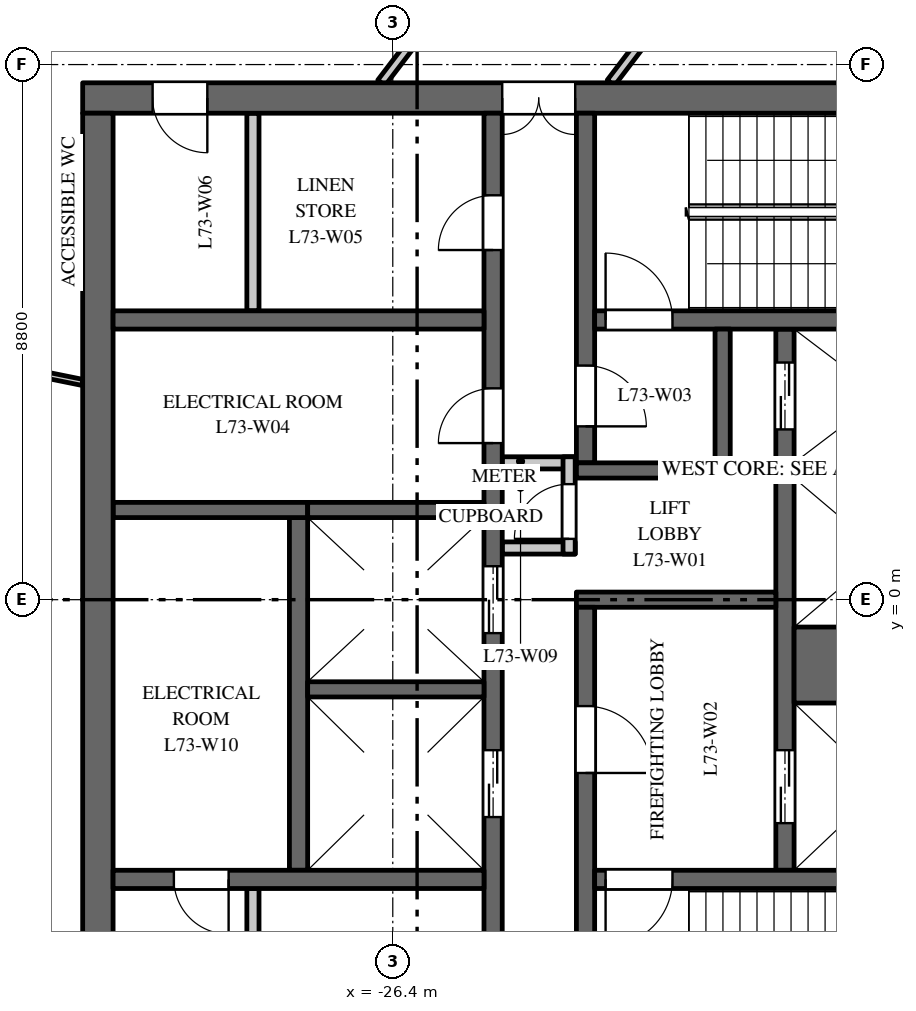
"""IFC4 building model, lengths in metres.
Left out: names, types, materials, properties, quantities, classifications, styles, units other than length and angle.
Written with IfcOpenShell. Run it as: python <this file> out.ifc"""

import sys

from ifc_helpers import new_model, si_unit, direction, frame, frame_2d, origin, origin_2d, place, context, subcontext, project, spatial, rectangle, extrude, element, fill, save


model = new_model("IFC4")
c1 = context("Model", 3, precision=1e-05, world=origin(), true_north=direction((0.0, 1.0)))
c2 = subcontext(c1, "Body", "Model", "MODEL_VIEW")
j1 = project(units=[si_unit("LENGTHUNIT", "METRE"), si_unit("PLANEANGLEUNIT", "RADIAN")], contexts=[c1])
p1 = place(None, origin())
s1 = spatial("IfcSite", under=j1, at=p1, CompositionType="ELEMENT")
p2 = place(p1, origin())
s2 = spatial("IfcBuilding", under=s1, at=p2, CompositionType="ELEMENT")
p3 = place(p2, frame((0.0, 0.0, 335.0)))
s3 = spatial("IfcBuildingStorey", under=s2, at=p3, CompositionType="ELEMENT", Elevation=335.0)
p4 = place(p3, frame((-32.531, 7.899, 0.021), z_axis=(0.238113704065, -0.077180859421, 0.968165780678), x_axis=(0.308341279213, 0.951275804135, 0.0)))
e1 = element("IfcColumn", 1, at=p4, inside=s3, PredefinedType="COLUMN", context=c2, shape_type="SweptSolid", body=[
    extrude(rectangle(XDim=0.85, YDim=0.85, at=origin_2d()), origin(), (0.0, 0.0, 1.0), 4.087),
])
p5 = place(p3, frame((-16.5, 8.25, 0.0), z_axis=(0.0, 0.0, 1.0), x_axis=(-1.0, 0.0, 0.0)))
e2 = element("IfcWall", 2, at=p5, inside=s3, PredefinedType="SHEAR", context=c2, shape_type="SweptSolid", body=[
    extrude(rectangle(XDim=15.0, YDim=0.5, at=frame_2d((7.5, 0.0))), origin(), (0.0, 0.0, 1.0), 3.7),
])
p6 = place(p5, frame((6.9, 0.0, 0.0)))
e3 = element("IfcOpeningElement", 3, at=p6, cuts=e2, PredefinedType="OPENING", context=c2, shape_type="SweptSolid", body=[
    extrude(rectangle(XDim=1.2, YDim=2.1, at=frame_2d((0.6, 1.05))), frame((0.0, 0.26, 0.0), z_axis=(0.0, -1.0, 0.0), x_axis=(1.0, 0.0, 0.0)), (0.0, 0.0, 1.0), 0.52),
])
p7 = place(p5, frame((12.95, 0.0, 0.0)))
e4 = element("IfcOpeningElement", 4, at=p7, cuts=e2, PredefinedType="OPENING", context=c2, shape_type="SweptSolid", body=[
    extrude(rectangle(XDim=0.9, YDim=2.1, at=frame_2d((0.45, 1.05))), frame((0.0, 0.26, 0.0), z_axis=(0.0, -1.0, 0.0), x_axis=(1.0, 0.0, 0.0)), (0.0, 0.0, 1.0), 0.52),
])
p8 = place(p3, frame((-27.95, -4.45, 0.0), z_axis=(0.0, 0.0, 1.0), x_axis=(0.0, 1.0, 0.0)))
e5 = element("IfcWall", 5, at=p8, inside=s3, PredefinedType="SHEAR", context=c2, shape_type="SweptSolid", body=[
    extrude(rectangle(XDim=5.8, YDim=0.3, at=frame_2d((2.9, 0.0))), origin(), (0.0, 0.0, 1.0), 3.7),
])
p9 = place(p3, frame((-27.8, 1.475, 0.0), z_axis=(0.0, 0.0, 1.0), x_axis=(-1.0, 0.0, 0.0)))
e6 = element("IfcWall", 6, at=p9, inside=s3, PredefinedType="SHEAR", context=c2, shape_type="SweptSolid", body=[
    extrude(rectangle(XDim=3.2, YDim=0.25, at=frame_2d((1.6, 0.0))), origin(), (0.0, 0.0, 1.0), 3.7),
])
p10 = place(p3, frame((-19.95, -4.45, 0.0), z_axis=(0.0, 0.0, 1.0), x_axis=(0.0, 1.0, 0.0)))
e7 = element("IfcWall", 7, at=p10, inside=s3, PredefinedType="SHEAR", context=c2, shape_type="SweptSolid", body=[
    extrude(rectangle(XDim=8.9, YDim=0.3, at=frame_2d((4.45, 0.0))), origin(), (0.0, 0.0, 1.0), 3.7),
])
p11 = place(p10, frame((0.775, 0.0, 0.0)))
e8 = element("IfcOpeningElement", 8, at=p11, cuts=e7, PredefinedType="OPENING", context=c2, shape_type="SweptSolid", body=[
    extrude(rectangle(XDim=1.2, YDim=2.1, at=frame_2d((0.6, 1.05))), frame((0.0, 0.16, 0.0), z_axis=(0.0, -1.0, 0.0), x_axis=(1.0, 0.0, 0.0)), (0.0, 0.0, 1.0), 0.32),
])
p12 = place(p10, frame((7.25, 0.0, 0.0)))
e9 = element("IfcOpeningElement", 9, at=p12, cuts=e7, PredefinedType="OPENING", context=c2, shape_type="SweptSolid", body=[
    extrude(rectangle(XDim=1.1, YDim=2.1, at=frame_2d((0.55, 1.05))), frame((0.0, 0.16, 0.0), z_axis=(0.0, -1.0, 0.0), x_axis=(1.0, 0.0, 0.0)), (0.0, 0.0, 1.0), 0.32),
])
p13 = place(p3, frame((-24.75, -8.0, 0.0), z_axis=(0.0, 0.0, 1.0), x_axis=(0.0, 1.0, 0.0)))
e10 = element("IfcWall", 10, at=p13, inside=s3, PredefinedType="SHEAR", context=c2, shape_type="SweptSolid", body=[
    extrude(rectangle(XDim=16.0, YDim=0.3, at=frame_2d((8.0, 0.0))), origin(), (0.0, 0.0, 1.0), 3.7),
])
p14 = place(p13, frame((4.425, 0.0, 0.0)))
e11 = element("IfcOpeningElement", 11, at=p14, cuts=e10, PredefinedType="OPENING", context=c2, shape_type="SweptSolid", body=[
    extrude(rectangle(XDim=1.1, YDim=2.1, at=frame_2d((0.55, 1.05))), frame((0.0, 0.16, 0.0), z_axis=(0.0, -1.0, 0.0), x_axis=(1.0, 0.0, 0.0)), (0.0, 0.0, 1.0), 0.32),
])
p15 = place(p13, frame((7.45, 0.0, 0.0)))
e12 = element("IfcOpeningElement", 12, at=p15, cuts=e10, PredefinedType="OPENING", context=c2, shape_type="SweptSolid", body=[
    extrude(rectangle(XDim=1.1, YDim=2.1, at=frame_2d((0.55, 1.05))), frame((0.0, 0.16, 0.0), z_axis=(0.0, -1.0, 0.0), x_axis=(1.0, 0.0, 0.0)), (0.0, 0.0, 1.0), 0.32),
])
p16 = place(p13, frame((10.575, 0.0, 0.0)))
e13 = element("IfcOpeningElement", 13, at=p16, cuts=e10, PredefinedType="OPENING", context=c2, shape_type="SweptSolid", body=[
    extrude(rectangle(XDim=0.9, YDim=2.1, at=frame_2d((0.45, 1.05))), frame((0.0, 0.16, 0.0), z_axis=(0.0, -1.0, 0.0), x_axis=(1.0, 0.0, 0.0)), (0.0, 0.0, 1.0), 0.32),
])
p17 = place(p13, frame((13.75, 0.0, 0.0)))
e14 = element("IfcOpeningElement", 14, at=p17, cuts=e10, PredefinedType="OPENING", context=c2, shape_type="SweptSolid", body=[
    extrude(rectangle(XDim=0.9, YDim=2.1, at=frame_2d((0.45, 1.05))), frame((0.0, 0.16, 0.0), z_axis=(0.0, -1.0, 0.0), x_axis=(1.0, 0.0, 0.0)), (0.0, 0.0, 1.0), 0.32),
])
p18 = place(p13, frame((1.35, 0.0, 0.0)))
e15 = element("IfcOpeningElement", 15, at=p18, cuts=e10, PredefinedType="OPENING", context=c2, shape_type="SweptSolid", body=[
    extrude(rectangle(XDim=0.9, YDim=2.1, at=frame_2d((0.45, 1.05))), frame((0.0, 0.16, 0.0), z_axis=(0.0, -1.0, 0.0), x_axis=(1.0, 0.0, 0.0)), (0.0, 0.0, 1.0), 0.32),
])
p19 = place(p3, frame((-20.1, 0.0, 0.0), z_axis=(0.0, 0.0, 1.0), x_axis=(-1.0, 0.0, 0.0)))
e16 = element("IfcWall", 16, at=p19, inside=s3, PredefinedType="SHEAR", context=c2, shape_type="SweptSolid", body=[
    extrude(rectangle(XDim=3.28, YDim=0.25, at=frame_2d((1.64, 0.0))), origin(), (0.0, 0.0, 1.0), 3.7),
])
for number, where, z_axis, x_axis in (
    (17, (-23.4, 0.85, 0.0), (0.0, 0.0, 1.0), (-1.0, 0.0, 0.0)),
    (18, (-23.4, 2.25, 0.0), (0.0, 0.0, 1.0), (-1.0, 0.0, 0.0)),
):
    element("IfcWall", number, at=place(p3, frame(where, z_axis=z_axis, x_axis=x_axis)), inside=s3, PredefinedType="PARTITIONING", context=c2, shape_type="SweptSolid", body=[
        extrude(rectangle(XDim=1.2, YDim=0.2, at=frame_2d((0.6, 0.0))), origin(), (0.0, 0.0, 1.0), 3.7),
    ])
p20 = place(p3, frame((-23.5, 0.75, 0.0), z_axis=(0.0, 0.0, 1.0), x_axis=(0.0, 1.0, 0.0)))
e19 = element("IfcWall", 19, at=p20, inside=s3, PredefinedType="PARTITIONING", context=c2, shape_type="SweptSolid", body=[
    extrude(rectangle(XDim=1.6, YDim=0.2, at=frame_2d((0.8, 0.0))), origin(), (0.0, 0.0, 1.0), 3.7),
])
p21 = place(p20, frame((0.25, 0.0, 0.0)))
e20 = element("IfcOpeningElement", 20, at=p21, cuts=e19, PredefinedType="OPENING", context=c2, shape_type="SweptSolid", body=[
    extrude(rectangle(XDim=0.9, YDim=2.1, at=frame_2d((0.45, 1.05))), frame((0.0, 0.11, 0.0), z_axis=(0.0, -1.0, 0.0), x_axis=(1.0, 0.0, 0.0)), (0.0, 0.0, 1.0), 0.22),
])
p22 = place(p3, frame((-31.25, -8.0, 0.0), z_axis=(0.0, 0.0, 1.0), x_axis=(0.0, 1.0, 0.0)))
e21 = element("IfcWall", 21, at=p22, inside=s3, PredefinedType="SHEAR", context=c2, shape_type="SweptSolid", body=[
    extrude(rectangle(XDim=16.0, YDim=0.5, at=frame_2d((8.0, 0.0))), origin(), (0.0, 0.0, 1.0), 3.7),
])
p23 = place(p3, frame((-24.9, 4.6, 0.0), z_axis=(0.0, 0.0, 1.0), x_axis=(-1.0, 0.0, 0.0)))
e22 = element("IfcWall", 22, at=p23, inside=s3, PredefinedType="SHEAR", context=c2, shape_type="SweptSolid", body=[
    extrude(rectangle(XDim=6.1, YDim=0.3, at=frame_2d((3.05, 0.0))), origin(), (0.0, 0.0, 1.0), 3.7),
])
for number, where, z_axis, x_axis in (
    (23, (-28.7, 4.75, 0.0), (0.0, 0.0, 1.0), (0.0, 1.0, 0.0)),
    (24, (-28.7, -8.0, 0.0), (0.0, 0.0, 1.0), (0.0, 1.0, 0.0)),
):
    element("IfcWall", number, at=place(p3, frame(where, z_axis=z_axis, x_axis=x_axis)), inside=s3, PredefinedType="PARTITIONING", context=c2, shape_type="SweptSolid", body=[
        extrude(rectangle(XDim=3.25, YDim=0.2, at=frame_2d((1.625, 0.0))), origin(), (0.0, 0.0, 1.0), 3.7),
    ])
p24 = place(p3, frame((-24.9, -4.6, 0.0), z_axis=(0.0, 0.0, 1.0), x_axis=(-1.0, 0.0, 0.0)))
e25 = element("IfcWall", 25, at=p24, inside=s3, PredefinedType="SHEAR", context=c2, shape_type="SweptSolid", body=[
    extrude(rectangle(XDim=6.1, YDim=0.3, at=frame_2d((3.05, 0.0))), origin(), (0.0, 0.0, 1.0), 3.7),
])
p25 = place(p24, frame((4.2, 0.0, 0.0)))
e26 = element("IfcOpeningElement", 26, at=p25, cuts=e25, PredefinedType="OPENING", context=c2, shape_type="SweptSolid", body=[
    extrude(rectangle(XDim=0.9, YDim=2.1, at=frame_2d((0.45, 1.05))), frame((0.0, 0.16, 0.0), z_axis=(0.0, -1.0, 0.0), x_axis=(1.0, 0.0, 0.0)), (0.0, 0.0, 1.0), 0.32),
])
p26 = place(p3, frame((-16.9, -1.075, 0.0), z_axis=(0.0, 0.0, 1.0), x_axis=(-1.0, 0.0, 0.0)))
e27 = element("IfcWall", 27, at=p26, inside=s3, PredefinedType="SHEAR", context=c2, shape_type="SweptSolid", body=[
    extrude(rectangle(XDim=2.9, YDim=1.25, at=frame_2d((1.45, 0.0))), origin(), (0.0, 0.0, 1.0), 3.7),
])
for number, where, z_axis, x_axis in (
    (28, (-16.9, 2.125, 0.0), (0.0, 0.0, 1.0), (-1.0, 0.0, 0.0)),
    (29, (-24.9, -1.475, 0.0), (0.0, 0.0, 1.0), (-1.0, 0.0, 0.0)),
    (30, (-24.9, 1.475, 0.0), (0.0, 0.0, 1.0), (-1.0, 0.0, 0.0)),
):
    element("IfcWall", number, at=place(p3, frame(where, z_axis=z_axis, x_axis=x_axis)), inside=s3, PredefinedType="SHEAR", context=c2, shape_type="SweptSolid", body=[
        extrude(rectangle(XDim=2.9, YDim=0.25, at=frame_2d((1.45, 0.0))), origin(), (0.0, 0.0, 1.0), 3.7),
    ])
p27 = place(p3, frame((-23.23, 2.25, 0.0), z_axis=(0.0, 0.0, 1.0), x_axis=(0.0, 1.0, 0.0)))
e31 = element("IfcWall", 31, at=p27, inside=s3, PredefinedType="SHEAR", context=c2, shape_type="SweptSolid", body=[
    extrude(rectangle(XDim=5.75, YDim=0.3, at=frame_2d((2.875, 0.0))), origin(), (0.0, 0.0, 1.0), 3.7),
])
p28 = place(p27, frame((0.6, 0.0, 0.0)))
e32 = element("IfcOpeningElement", 32, at=p28, cuts=e31, PredefinedType="OPENING", context=c2, shape_type="SweptSolid", body=[
    extrude(rectangle(XDim=1.0, YDim=2.1, at=frame_2d((0.5, 1.05))), frame((0.0, 0.16, 0.0), z_axis=(0.0, -1.0, 0.0), x_axis=(1.0, 0.0, 0.0)), (0.0, 0.0, 1.0), 0.32),
])
p29 = place(p3, frame((-23.23, -8.0, 0.0), z_axis=(0.0, 0.0, 1.0), x_axis=(0.0, 1.0, 0.0)))
e33 = element("IfcWall", 33, at=p29, inside=s3, PredefinedType="SHEAR", context=c2, shape_type="SweptSolid", body=[
    extrude(rectangle(XDim=7.875, YDim=0.3, at=frame_2d((3.938, 0.0))), origin(), (0.0, 0.0, 1.0), 3.7),
])
p30 = place(p29, frame((5.15, 0.0, 0.0)))
e34 = element("IfcOpeningElement", 34, at=p30, cuts=e33, PredefinedType="OPENING", context=c2, shape_type="SweptSolid", body=[
    extrude(rectangle(XDim=1.1, YDim=2.1, at=frame_2d((0.55, 1.05))), frame((0.0, 0.16, 0.0), z_axis=(0.0, -1.0, 0.0), x_axis=(1.0, 0.0, 0.0)), (0.0, 0.0, 1.0), 0.32),
])
p31 = place(p3, frame((-16.9, 4.6, 0.0), z_axis=(0.0, 0.0, 1.0), x_axis=(-1.0, 0.0, 0.0)))
e35 = element("IfcWall", 35, at=p31, inside=s3, PredefinedType="SHEAR", context=c2, shape_type="SweptSolid", body=[
    extrude(rectangle(XDim=6.18, YDim=0.3, at=frame_2d((3.09, 0.0))), origin(), (0.0, 0.0, 1.0), 3.7),
])
p32 = place(p31, frame((4.9, 0.0, 0.0)))
e36 = element("IfcOpeningElement", 36, at=p32, cuts=e35, PredefinedType="OPENING", context=c2, shape_type="SweptSolid", body=[
    extrude(rectangle(XDim=1.1, YDim=2.1, at=frame_2d((0.55, 1.05))), frame((0.0, 0.16, 0.0), z_axis=(0.0, -1.0, 0.0), x_axis=(1.0, 0.0, 0.0)), (0.0, 0.0, 1.0), 0.32),
])
p33 = place(p3, frame((-16.9, -4.6, 0.0), z_axis=(0.0, 0.0, 1.0), x_axis=(-1.0, 0.0, 0.0)))
e37 = element("IfcWall", 37, at=p33, inside=s3, PredefinedType="SHEAR", context=c2, shape_type="SweptSolid", body=[
    extrude(rectangle(XDim=6.18, YDim=0.3, at=frame_2d((3.09, 0.0))), origin(), (0.0, 0.0, 1.0), 3.7),
])
p34 = place(p33, frame((4.9, 0.0, 0.0)))
e38 = element("IfcOpeningElement", 38, at=p34, cuts=e37, PredefinedType="OPENING", context=c2, shape_type="SweptSolid", body=[
    extrude(rectangle(XDim=1.1, YDim=2.1, at=frame_2d((0.55, 1.05))), frame((0.0, 0.16, 0.0), z_axis=(0.0, -1.0, 0.0), x_axis=(1.0, 0.0, 0.0)), (0.0, 0.0, 1.0), 0.32),
])
p35 = place(p3, frame((-20.85, 2.125, 0.0), z_axis=(0.0, 0.0, 1.0), x_axis=(-1.0, 0.0, 0.0)))
e39 = element("IfcWall", 39, at=p35, inside=s3, PredefinedType="SHEAR", context=c2, shape_type="SweptSolid", body=[
    extrude(rectangle(XDim=2.53, YDim=0.25, at=frame_2d((1.265, 0.0))), origin(), (0.0, 0.0, 1.0), 3.7),
])
p36 = place(p3, frame((-20.975, 2.25, 0.0), z_axis=(0.0, 0.0, 1.0), x_axis=(0.0, 1.0, 0.0)))
e40 = element("IfcWall", 40, at=p36, inside=s3, PredefinedType="SHEAR", context=c2, shape_type="SweptSolid", body=[
    extrude(rectangle(XDim=2.2, YDim=0.25, at=frame_2d((1.1, 0.0))), origin(), (0.0, 0.0, 1.0), 3.7),
])
p37 = place(p3, frame((-34.713, 4.223, 0.0), z_axis=(0.0, 0.0, 1.0), x_axis=(0.980101708204, -0.198495948512, 0.0)))
e41 = element("IfcWall", 41, at=p37, inside=s3, PredefinedType="PARTITIONING", context=c2, shape_type="SweptSolid", body=[
    extrude(rectangle(XDim=3.274, YDim=0.1, at=frame_2d((1.637, 0.0))), origin(), (0.0, 0.0, 1.0), 3.2),
])
p38 = place(p3, frame((-26.587, 8.5, 0.0), z_axis=(0.0, 0.0, 1.0), x_axis=(0.606510838275, 0.795075218489, 0.0)))
e42 = element("IfcWall", 42, at=p38, inside=s3, PredefinedType="PARTITIONING", context=c2, shape_type="SweptSolid", body=[
    extrude(rectangle(XDim=3.648, YDim=0.15, at=frame_2d((1.824, 0.0))), origin(), (0.0, 0.0, 1.0), 3.2),
])
p39 = place(p3, frame((-22.813, 8.5, 0.0), z_axis=(0.0, 0.0, 1.0), x_axis=(0.606264206509, 0.795263297221, 0.0)))
e43 = element("IfcWall", 43, at=p39, inside=s3, PredefinedType="PARTITIONING", context=c2, shape_type="SweptSolid", body=[
    extrude(rectangle(XDim=1.132, YDim=0.15, at=frame_2d((0.566, 0.0))), origin(), (0.0, 0.0, 1.0), 3.2),
])
p40 = place(p11, origin())
e44 = element("IfcDoor", 44, at=p40, inside=s3, OperationType="DOUBLE_DOOR_SLIDING", PredefinedType="DOOR", context=c2, shape_type="SweptSolid", body=[
    extrude(rectangle(XDim=1.2, YDim=2.1, at=frame_2d((0.6, 1.05))), frame((0.0, 0.025, 0.0), z_axis=(0.0, -1.0, 0.0), x_axis=(1.0, 0.0, 0.0)), (0.0, 0.0, 1.0), 0.05),
])
fill(e8, e44)
p41 = place(p12, origin())
e45 = element("IfcDoor", 45, at=p41, inside=s3, OperationType="DOUBLE_DOOR_SLIDING", PredefinedType="DOOR", context=c2, shape_type="SweptSolid", body=[
    extrude(rectangle(XDim=1.1, YDim=2.1, at=frame_2d((0.55, 1.05))), frame((0.0, 0.025, 0.0), z_axis=(0.0, -1.0, 0.0), x_axis=(1.0, 0.0, 0.0)), (0.0, 0.0, 1.0), 0.05),
])
fill(e9, e45)
p42 = place(p14, origin())
e46 = element("IfcDoor", 46, at=p42, inside=s3, OperationType="DOUBLE_DOOR_SLIDING", PredefinedType="DOOR", context=c2, shape_type="SweptSolid", body=[
    extrude(rectangle(XDim=1.1, YDim=2.1, at=frame_2d((0.55, 1.05))), frame((0.0, 0.025, 0.0), z_axis=(0.0, -1.0, 0.0), x_axis=(1.0, 0.0, 0.0)), (0.0, 0.0, 1.0), 0.05),
])
fill(e11, e46)
p43 = place(p15, origin())
e47 = element("IfcDoor", 47, at=p43, inside=s3, OperationType="DOUBLE_DOOR_SLIDING", PredefinedType="DOOR", context=c2, shape_type="SweptSolid", body=[
    extrude(rectangle(XDim=1.1, YDim=2.1, at=frame_2d((0.55, 1.05))), frame((0.0, 0.025, 0.0), z_axis=(0.0, -1.0, 0.0), x_axis=(1.0, 0.0, 0.0)), (0.0, 0.0, 1.0), 0.05),
])
fill(e12, e47)
p44 = place(p32, origin())
e48 = element("IfcDoor", 48, at=p44, inside=s3, OperationType="SINGLE_SWING_RIGHT", PredefinedType="DOOR", context=c2, shape_type="SweptSolid", body=[
    extrude(rectangle(XDim=1.1, YDim=2.1, at=frame_2d((0.55, 1.05))), frame((0.0, 0.025, 0.0), z_axis=(0.0, -1.0, 0.0), x_axis=(1.0, 0.0, 0.0)), (0.0, 0.0, 1.0), 0.05),
])
fill(e36, e48)
p45 = place(p34, origin())
e49 = element("IfcDoor", 49, at=p45, inside=s3, OperationType="SINGLE_SWING_LEFT", PredefinedType="DOOR", context=c2, shape_type="SweptSolid", body=[
    extrude(rectangle(XDim=1.1, YDim=2.1, at=frame_2d((0.55, 1.05))), frame((0.0, 0.025, 0.0), z_axis=(0.0, -1.0, 0.0), x_axis=(1.0, 0.0, 0.0)), (0.0, 0.0, 1.0), 0.05),
])
fill(e38, e49)
p46 = place(p30, origin())
e50 = element("IfcDoor", 50, at=p46, inside=s3, OperationType="SINGLE_SWING_LEFT", PredefinedType="DOOR", context=c2, shape_type="SweptSolid", body=[
    extrude(rectangle(XDim=1.1, YDim=2.1, at=frame_2d((0.55, 1.05))), frame((0.0, 0.025, 0.0), z_axis=(0.0, -1.0, 0.0), x_axis=(1.0, 0.0, 0.0)), (0.0, 0.0, 1.0), 0.05),
])
fill(e34, e50)
p47 = place(p28, origin())
e51 = element("IfcDoor", 51, at=p47, inside=s3, OperationType="SINGLE_SWING_LEFT", PredefinedType="DOOR", context=c2, shape_type="SweptSolid", body=[
    extrude(rectangle(XDim=1.0, YDim=2.1, at=frame_2d((0.5, 1.05))), frame((0.0, 0.025, 0.0), z_axis=(0.0, -1.0, 0.0), x_axis=(1.0, 0.0, 0.0)), (0.0, 0.0, 1.0), 0.05),
])
fill(e32, e51)
p48 = place(p6, origin())
e52 = element("IfcDoor", 52, at=p48, inside=s3, OperationType="DOUBLE_DOOR_DOUBLE_SWING", PredefinedType="DOOR", context=c2, shape_type="SweptSolid", body=[
    extrude(rectangle(XDim=1.2, YDim=2.1, at=frame_2d((0.6, 1.05))), frame((0.0, 0.025, 0.0), z_axis=(0.0, -1.0, 0.0), x_axis=(1.0, 0.0, 0.0)), (0.0, 0.0, 1.0), 0.05),
])
fill(e3, e52)
p49 = place(p16, origin())
e53 = element("IfcDoor", 53, at=p49, inside=s3, OperationType="SINGLE_SWING_RIGHT", PredefinedType="DOOR", context=c2, shape_type="SweptSolid", body=[
    extrude(rectangle(XDim=0.9, YDim=2.1, at=frame_2d((0.45, 1.05))), frame((0.0, 0.025, 0.0), z_axis=(0.0, -1.0, 0.0), x_axis=(1.0, 0.0, 0.0)), (0.0, 0.0, 1.0), 0.05),
])
fill(e13, e53)
p50 = place(p17, origin())
e54 = element("IfcDoor", 54, at=p50, inside=s3, OperationType="SINGLE_SWING_RIGHT", PredefinedType="DOOR", context=c2, shape_type="SweptSolid", body=[
    extrude(rectangle(XDim=0.9, YDim=2.1, at=frame_2d((0.45, 1.05))), frame((0.0, 0.025, 0.0), z_axis=(0.0, -1.0, 0.0), x_axis=(1.0, 0.0, 0.0)), (0.0, 0.0, 1.0), 0.05),
])
fill(e14, e54)
p51 = place(p7, origin())
e55 = element("IfcDoor", 55, at=p51, inside=s3, OperationType="SINGLE_SWING_RIGHT", PredefinedType="DOOR", context=c2, shape_type="SweptSolid", body=[
    extrude(rectangle(XDim=0.9, YDim=2.1, at=frame_2d((0.45, 1.05))), frame((0.0, 0.025, 0.0), z_axis=(0.0, -1.0, 0.0), x_axis=(1.0, 0.0, 0.0)), (0.0, 0.0, 1.0), 0.05),
])
fill(e4, e55)
p52 = place(p21, origin())
e56 = element("IfcDoor", 56, at=p52, inside=s3, OperationType="SINGLE_SWING_RIGHT", PredefinedType="DOOR", context=c2, shape_type="SweptSolid", body=[
    extrude(rectangle(XDim=0.9, YDim=2.1, at=frame_2d((0.45, 1.05))), frame((0.0, 0.025, 0.0), z_axis=(0.0, -1.0, 0.0), x_axis=(1.0, 0.0, 0.0)), (0.0, 0.0, 1.0), 0.05),
])
fill(e20, e56)
p53 = place(p25, origin())
e57 = element("IfcDoor", 57, at=p53, inside=s3, OperationType="SINGLE_SWING_RIGHT", PredefinedType="DOOR", context=c2, shape_type="SweptSolid", body=[
    extrude(rectangle(XDim=0.9, YDim=2.1, at=frame_2d((0.45, 1.05))), frame((0.0, 0.025, 0.0), z_axis=(0.0, -1.0, 0.0), x_axis=(1.0, 0.0, 0.0)), (0.0, 0.0, 1.0), 0.05),
])
fill(e26, e57)
save(model, sys.argv[1])
